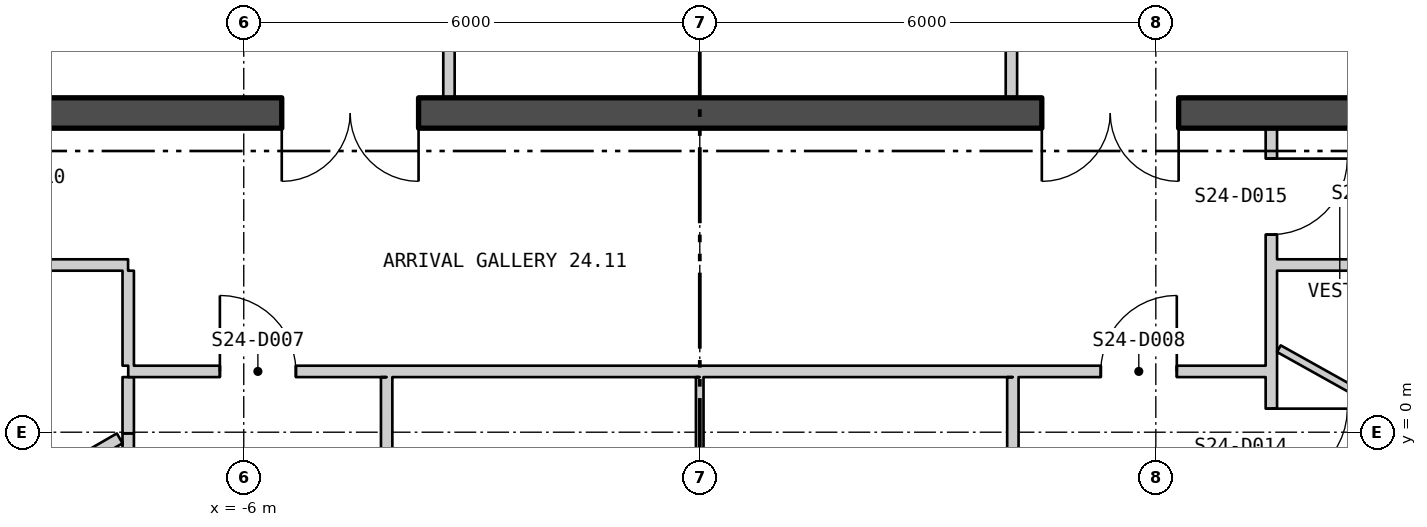
"""IFC4 building model, lengths in metres.
Left out: names, types, materials, properties, quantities, classifications, styles, units other than length and angle.
Written with IfcOpenShell. Run it as: python <this file> out.ifc"""

import sys

from ifc_helpers import new_model, si_unit, direction, frame, frame_2d, origin, place, context, subcontext, project, spatial, polyline, rectangle, outline, extrude, element, fill, save


model = new_model("IFC4")
c1 = context("Model", 3, precision=1e-05, world=origin(), true_north=direction((0.0, 1.0)))
c2 = subcontext(c1, "Body", "Model", "MODEL_VIEW")
j1 = project(units=[si_unit("LENGTHUNIT", "METRE"), si_unit("PLANEANGLEUNIT", "RADIAN")], contexts=[c1])
p1 = place(None, origin())
s1 = spatial("IfcSite", under=j1, at=p1, CompositionType="ELEMENT")
p2 = place(p1, origin())
s2 = spatial("IfcBuilding", under=s1, at=p2, CompositionType="ELEMENT")
p3 = place(p2, frame((0.0, 0.0, 312.6)))
s3 = spatial("IfcBuildingStorey", under=s2, at=p3, CompositionType="ELEMENT", Elevation=312.6)
p4 = place(p3, frame((-24.985, 16.303, -0.18), z_axis=(0.0, 0.0, 1.0), x_axis=(0.500000141277, -0.866025322218, 0.0)))
e1 = element("IfcWall", 1, at=p4, inside=s3, PredefinedType="SOLIDWALL", context=c2, shape_type="SweptSolid", body=[
    extrude(outline(polyline([(-0.13, -0.225), (45.86, -0.225), (45.6, 0.225), (0.13, 0.225), (-0.13, -0.225)])), origin(), (0.0, 0.0, 1.0), 3.98),
])
p5 = place(p4, frame((1.424, 0.0, 1.08)))
e2 = element("IfcOpeningElement", 2, at=p5, cuts=e1, PredefinedType="OPENING", context=c2, shape_type="SweptSolid", body=[
    extrude(rectangle(XDim=2.4, YDim=2.3, at=frame_2d((1.2, 1.15))), frame((0.0, 0.235, 0.0), z_axis=(0.0, -1.0, 0.0), x_axis=(1.0, 0.0, 0.0)), (0.0, 0.0, 1.0), 0.47),
])
p6 = place(p4, frame((5.892, 0.0, 1.08)))
e3 = element("IfcOpeningElement", 3, at=p6, cuts=e1, PredefinedType="OPENING", context=c2, shape_type="SweptSolid", body=[
    extrude(rectangle(XDim=2.4, YDim=2.3, at=frame_2d((1.2, 1.15))), frame((0.0, 0.235, 0.0), z_axis=(0.0, -1.0, 0.0), x_axis=(1.0, 0.0, 0.0)), (0.0, 0.0, 1.0), 0.47),
])
p7 = place(p4, frame((10.399, 0.0, 1.08)))
e4 = element("IfcOpeningElement", 4, at=p7, cuts=e1, PredefinedType="OPENING", context=c2, shape_type="SweptSolid", body=[
    extrude(rectangle(XDim=2.4, YDim=2.3, at=frame_2d((1.2, 1.15))), frame((0.0, 0.235, 0.0), z_axis=(0.0, -1.0, 0.0), x_axis=(1.0, 0.0, 0.0)), (0.0, 0.0, 1.0), 0.47),
])
p8 = place(p4, frame((14.905, 0.0, 1.08)))
e5 = element("IfcOpeningElement", 5, at=p8, cuts=e1, PredefinedType="OPENING", context=c2, shape_type="SweptSolid", body=[
    extrude(rectangle(XDim=2.4, YDim=2.3, at=frame_2d((1.2, 1.15))), frame((0.0, 0.235, 0.0), z_axis=(0.0, -1.0, 0.0), x_axis=(1.0, 0.0, 0.0)), (0.0, 0.0, 1.0), 0.47),
])
p9 = place(p4, frame((19.412, 0.0, 1.08)))
e6 = element("IfcOpeningElement", 6, at=p9, cuts=e1, PredefinedType="OPENING", context=c2, shape_type="SweptSolid", body=[
    extrude(rectangle(XDim=2.4, YDim=2.3, at=frame_2d((1.2, 1.15))), frame((0.0, 0.235, 0.0), z_axis=(0.0, -1.0, 0.0), x_axis=(1.0, 0.0, 0.0)), (0.0, 0.0, 1.0), 0.47),
])
p10 = place(p4, frame((23.918, 0.0, 1.08)))
e7 = element("IfcOpeningElement", 7, at=p10, cuts=e1, PredefinedType="OPENING", context=c2, shape_type="SweptSolid", body=[
    extrude(rectangle(XDim=2.4, YDim=2.3, at=frame_2d((1.2, 1.15))), frame((0.0, 0.235, 0.0), z_axis=(0.0, -1.0, 0.0), x_axis=(1.0, 0.0, 0.0)), (0.0, 0.0, 1.0), 0.47),
])
p11 = place(p4, frame((28.425, 0.0, 1.08)))
e8 = element("IfcOpeningElement", 8, at=p11, cuts=e1, PredefinedType="OPENING", context=c2, shape_type="SweptSolid", body=[
    extrude(rectangle(XDim=2.4, YDim=2.3, at=frame_2d((1.2, 1.15))), frame((0.0, 0.235, 0.0), z_axis=(0.0, -1.0, 0.0), x_axis=(1.0, 0.0, 0.0)), (0.0, 0.0, 1.0), 0.47),
])
p12 = place(p4, frame((37.438, 0.0, 1.08)))
e9 = element("IfcOpeningElement", 9, at=p12, cuts=e1, PredefinedType="OPENING", context=c2, shape_type="SweptSolid", body=[
    extrude(rectangle(XDim=2.4, YDim=2.3, at=frame_2d((1.2, 1.15))), frame((0.0, 0.235, 0.0), z_axis=(0.0, -1.0, 0.0), x_axis=(1.0, 0.0, 0.0)), (0.0, 0.0, 1.0), 0.47),
])
p13 = place(p4, frame((41.907, 0.0, 1.08)))
e10 = element("IfcOpeningElement", 10, at=p13, cuts=e1, PredefinedType="OPENING", context=c2, shape_type="SweptSolid", body=[
    extrude(rectangle(XDim=2.4, YDim=2.3, at=frame_2d((1.2, 1.15))), frame((0.0, 0.235, 0.0), z_axis=(0.0, -1.0, 0.0), x_axis=(1.0, 0.0, 0.0)), (0.0, 0.0, 1.0), 0.47),
])
p14 = place(p3, frame((2.12, -23.301, -0.18), z_axis=(0.0, 0.0, 1.0), x_axis=(0.500000141277, 0.866025322218, 0.0)))
e11 = element("IfcWall", 11, at=p14, inside=s3, PredefinedType="SOLIDWALL", context=c2, shape_type="SweptSolid", body=[
    extrude(outline(polyline([(-0.13, -0.225), (45.86, -0.225), (45.6, 0.225), (0.13, 0.225), (-0.13, -0.225)])), origin(), (0.0, 0.0, 1.0), 3.98),
])
p15 = place(p14, frame((1.424, 0.0, 1.08)))
e12 = element("IfcOpeningElement", 12, at=p15, cuts=e11, PredefinedType="OPENING", context=c2, shape_type="SweptSolid", body=[
    extrude(rectangle(XDim=2.4, YDim=2.3, at=frame_2d((1.2, 1.15))), frame((0.0, 0.235, 0.0), z_axis=(0.0, -1.0, 0.0), x_axis=(1.0, 0.0, 0.0)), (0.0, 0.0, 1.0), 0.47),
])
p16 = place(p14, frame((5.892, 0.0, 1.08)))
e13 = element("IfcOpeningElement", 13, at=p16, cuts=e11, PredefinedType="OPENING", context=c2, shape_type="SweptSolid", body=[
    extrude(rectangle(XDim=2.4, YDim=2.3, at=frame_2d((1.2, 1.15))), frame((0.0, 0.235, 0.0), z_axis=(0.0, -1.0, 0.0), x_axis=(1.0, 0.0, 0.0)), (0.0, 0.0, 1.0), 0.47),
])
p17 = place(p14, frame((14.905, 0.0, 1.08)))
e14 = element("IfcOpeningElement", 14, at=p17, cuts=e11, PredefinedType="OPENING", context=c2, shape_type="SweptSolid", body=[
    extrude(rectangle(XDim=2.4, YDim=2.3, at=frame_2d((1.2, 1.15))), frame((0.0, 0.235, 0.0), z_axis=(0.0, -1.0, 0.0), x_axis=(1.0, 0.0, 0.0)), (0.0, 0.0, 1.0), 0.47),
])
p18 = place(p14, frame((19.412, 0.0, 1.08)))
e15 = element("IfcOpeningElement", 15, at=p18, cuts=e11, PredefinedType="OPENING", context=c2, shape_type="SweptSolid", body=[
    extrude(rectangle(XDim=2.4, YDim=2.3, at=frame_2d((1.2, 1.15))), frame((0.0, 0.235, 0.0), z_axis=(0.0, -1.0, 0.0), x_axis=(1.0, 0.0, 0.0)), (0.0, 0.0, 1.0), 0.47),
])
p19 = place(p14, frame((23.918, 0.0, 1.08)))
e16 = element("IfcOpeningElement", 16, at=p19, cuts=e11, PredefinedType="OPENING", context=c2, shape_type="SweptSolid", body=[
    extrude(rectangle(XDim=2.4, YDim=2.3, at=frame_2d((1.2, 1.15))), frame((0.0, 0.235, 0.0), z_axis=(0.0, -1.0, 0.0), x_axis=(1.0, 0.0, 0.0)), (0.0, 0.0, 1.0), 0.47),
])
p20 = place(p14, frame((28.425, 0.0, 1.08)))
e17 = element("IfcOpeningElement", 17, at=p20, cuts=e11, PredefinedType="OPENING", context=c2, shape_type="SweptSolid", body=[
    extrude(rectangle(XDim=2.4, YDim=2.3, at=frame_2d((1.2, 1.15))), frame((0.0, 0.235, 0.0), z_axis=(0.0, -1.0, 0.0), x_axis=(1.0, 0.0, 0.0)), (0.0, 0.0, 1.0), 0.47),
])
p21 = place(p14, frame((37.438, 0.0, 1.08)))
e18 = element("IfcOpeningElement", 18, at=p21, cuts=e11, PredefinedType="OPENING", context=c2, shape_type="SweptSolid", body=[
    extrude(rectangle(XDim=2.4, YDim=2.3, at=frame_2d((1.2, 1.15))), frame((0.0, 0.235, 0.0), z_axis=(0.0, -1.0, 0.0), x_axis=(1.0, 0.0, 0.0)), (0.0, 0.0, 1.0), 0.47),
])
p22 = place(p14, frame((41.907, 0.0, 1.08)))
e19 = element("IfcOpeningElement", 19, at=p22, cuts=e11, PredefinedType="OPENING", context=c2, shape_type="SweptSolid", body=[
    extrude(rectangle(XDim=2.4, YDim=2.3, at=frame_2d((1.2, 1.15))), frame((0.0, 0.235, 0.0), z_axis=(0.0, -1.0, 0.0), x_axis=(1.0, 0.0, 0.0)), (0.0, 0.0, 1.0), 0.47),
])
p23 = place(p3, frame((-14.5, 4.2, 0.0), z_axis=(0.0, 0.0, 1.0), x_axis=(1.0, 0.0, 0.0)))
e20 = element("IfcWall", 20, at=p23, inside=s3, PredefinedType="SHEAR", context=c2, shape_type="SweptSolid", body=[
    extrude(rectangle(XDim=29.0, YDim=0.4, at=frame_2d((14.5, 0.0))), origin(), (0.0, 0.0, 1.0), 4.0),
])
p24 = place(p23, frame((9.0, 0.0, 0.0)))
e21 = element("IfcOpeningElement", 21, at=p24, cuts=e20, PredefinedType="OPENING", context=c2, shape_type="SweptSolid", body=[
    extrude(rectangle(XDim=1.8, YDim=2.4, at=frame_2d((0.9, 1.2))), frame((0.0, 0.21, 0.0), z_axis=(0.0, -1.0, 0.0), x_axis=(1.0, 0.0, 0.0)), (0.0, 0.0, 1.0), 0.42),
])
p25 = place(p23, frame((19.0, 0.0, 0.0)))
e22 = element("IfcOpeningElement", 22, at=p25, cuts=e20, PredefinedType="OPENING", context=c2, shape_type="SweptSolid", body=[
    extrude(rectangle(XDim=1.8, YDim=2.4, at=frame_2d((0.9, 1.2))), frame((0.0, 0.21, 0.0), z_axis=(0.0, -1.0, 0.0), x_axis=(1.0, 0.0, 0.0)), (0.0, 0.0, 1.0), 0.42),
])
for number, where, z_axis, x_axis in (
    (23, (-3.3, 4.4, 0.0), (0.0, 0.0, 1.0), (0.0, 1.0, 0.0)),
    (24, (4.1, 4.4, 0.0), (0.0, 0.0, 1.0), (0.0, 1.0, 0.0)),
):
    element("IfcWall", number, at=place(p3, frame(where, z_axis=z_axis, x_axis=x_axis)), inside=s3, PredefinedType="PARTITIONING", context=c2, shape_type="SweptSolid", body=[
        extrude(rectangle(XDim=1.895, YDim=0.15, at=frame_2d((0.948, 0.0))), origin(), (0.0, 0.0, 1.0), 4.0),
    ])
p26 = place(p3, frame((-16.225, 2.2, 0.0), z_axis=(0.0, 0.0, 1.0), x_axis=(1.0, 0.0, 0.0)))
e25 = element("IfcWall", 25, at=p26, inside=s3, PredefinedType="PARTITIONING", context=c2, shape_type="SweptSolid", body=[
    extrude(rectangle(XDim=8.703, YDim=0.15, at=frame_2d((4.351, 0.0))), origin(), (0.0, 0.0, 1.0), 4.0),
])
p27 = place(p26, frame((4.232, 0.0, 0.0)))
e26 = element("IfcOpeningElement", 26, at=p27, cuts=e25, PredefinedType="OPENING", context=c2, shape_type="SweptSolid", body=[
    extrude(rectangle(XDim=1.8, YDim=2.1, at=frame_2d((0.9, 1.05))), frame((0.0, 0.085, 0.0), z_axis=(0.0, -1.0, 0.0), x_axis=(1.0, 0.0, 0.0)), (0.0, 0.0, 1.0), 0.17),
])
p28 = place(p3, frame((-12.968, -3.161, 0.0), z_axis=(0.0, 0.0, 1.0), x_axis=(0.8660774803, 0.499909789979, 0.0)))
e27 = element("IfcWall", 27, at=p28, inside=s3, PredefinedType="PARTITIONING", context=c2, shape_type="SweptSolid", body=[
    extrude(rectangle(XDim=6.161, YDim=0.15, at=frame_2d((3.081, 0.0))), origin(), (0.0, 0.0, 1.0), 4.0),
])
p29 = place(p3, frame((-7.52, -13.498, 0.0), z_axis=(0.0, 0.0, 1.0), x_axis=(0.0, 1.0, 0.0)))
e28 = element("IfcWall", 28, at=p29, inside=s3, PredefinedType="PARTITIONING", context=c2, shape_type="SweptSolid", body=[
    extrude(rectangle(XDim=13.482, YDim=0.15, at=frame_2d((6.741, 0.0))), origin(), (0.0, 0.0, 1.0), 4.0),
])
p30 = place(p29, frame((3.639, 0.0, 0.0)))
e29 = element("IfcOpeningElement", 29, at=p30, cuts=e28, PredefinedType="OPENING", context=c2, shape_type="SweptSolid", body=[
    extrude(rectangle(XDim=1.0, YDim=2.1, at=frame_2d((0.5, 1.05))), frame((0.0, 0.085, 0.0), z_axis=(0.0, -1.0, 0.0), x_axis=(1.0, 0.0, 0.0)), (0.0, 0.0, 1.0), 0.17),
])
p31 = place(p29, frame((11.681, 0.0, 0.0)))
e30 = element("IfcOpeningElement", 30, at=p31, cuts=e28, PredefinedType="OPENING", context=c2, shape_type="SweptSolid", body=[
    extrude(rectangle(XDim=1.0, YDim=2.1, at=frame_2d((0.5, 1.05))), frame((0.0, 0.085, 0.0), z_axis=(0.0, -1.0, 0.0), x_axis=(1.0, 0.0, 0.0)), (0.0, 0.0, 1.0), 0.17),
])
p32 = place(p3, frame((-7.52, -0.014, 0.0), z_axis=(0.0, 0.0, 1.0), x_axis=(0.0, 1.0, 0.0)))
e31 = element("IfcWall", 31, at=p32, inside=s3, PredefinedType="PARTITIONING", context=c2, shape_type="SweptSolid", body=[
    extrude(rectangle(XDim=0.739, YDim=0.15, at=frame_2d((0.369, 0.0))), origin(), (0.0, 0.0, 1.0), 4.0),
])
p33 = place(p3, frame((-7.52, 0.8, 0.0), z_axis=(0.0, 0.0, 1.0), x_axis=(1.0, 0.0, 0.0)))
e32 = element("IfcWall", 32, at=p33, inside=s3, PredefinedType="PARTITIONING", context=c2, shape_type="SweptSolid", body=[
    extrude(rectangle(XDim=14.965, YDim=0.15, at=frame_2d((7.482, 0.0))), origin(), (0.0, 0.0, 1.0), 4.0),
])
p34 = place(p33, frame((1.206, 0.0, 0.0)))
e33 = element("IfcOpeningElement", 33, at=p34, cuts=e32, PredefinedType="OPENING", context=c2, shape_type="SweptSolid", body=[
    extrude(rectangle(XDim=1.0, YDim=2.1, at=frame_2d((0.5, 1.05))), frame((0.0, 0.085, 0.0), z_axis=(0.0, -1.0, 0.0), x_axis=(1.0, 0.0, 0.0)), (0.0, 0.0, 1.0), 0.17),
])
p35 = place(p33, frame((12.796, 0.0, 0.0)))
e34 = element("IfcOpeningElement", 34, at=p35, cuts=e32, PredefinedType="OPENING", context=c2, shape_type="SweptSolid", body=[
    extrude(rectangle(XDim=1.0, YDim=2.1, at=frame_2d((0.5, 1.05))), frame((0.0, 0.085, 0.0), z_axis=(0.0, -1.0, 0.0), x_axis=(1.0, 0.0, 0.0)), (0.0, 0.0, 1.0), 0.17),
])
p36 = place(p3, frame((-7.52, 0.875, 0.0), z_axis=(0.0, 0.0, 1.0), x_axis=(0.0, 1.0, 0.0)))
e35 = element("IfcWall", 35, at=p36, inside=s3, PredefinedType="PARTITIONING", context=c2, shape_type="SweptSolid", body=[
    extrude(rectangle(XDim=1.25, YDim=0.15, at=frame_2d((0.625, 0.0))), origin(), (0.0, 0.0, 1.0), 4.0),
])
p37 = place(p3, frame((-4.12, 0.725, 0.0), z_axis=(0.0, 0.0, 1.0), x_axis=(0.000237812122, -0.999999971723, 0.0)))
e36 = element("IfcWall", 36, at=p37, inside=s3, PredefinedType="PARTITIONING", context=c2, shape_type="SweptSolid", body=[
    extrude(rectangle(XDim=4.205, YDim=0.15, at=frame_2d((2.103, 0.0))), origin(), (0.0, 0.0, 1.0), 4.0),
])
p38 = place(p37, frame((3.005, 0.0, 0.0)))
e37 = element("IfcOpeningElement", 37, at=p38, cuts=e36, PredefinedType="OPENING", context=c2, shape_type="SweptSolid", body=[
    extrude(rectangle(XDim=1.0, YDim=2.1, at=frame_2d((0.5, 1.05))), frame((0.0, 0.085, 0.0), z_axis=(0.0, -1.0, 0.0), x_axis=(1.0, 0.0, 0.0)), (0.0, 0.0, 1.0), 0.17),
])
p39 = place(p3, frame((-0.001, 0.725, 0.0), z_axis=(0.0, 0.0, 1.0), x_axis=(0.000235294111, -0.999999972318, 0.0)))
e38 = element("IfcWall", 38, at=p39, inside=s3, PredefinedType="PARTITIONING", context=c2, shape_type="SweptSolid", body=[
    extrude(rectangle(XDim=3.825, YDim=0.1, at=frame_2d((1.913, 0.0))), origin(), (0.0, 0.0, 1.0), 3.55),
])
p40 = place(p3, frame((4.119, 0.725, 0.0), z_axis=(0.0, 0.0, 1.0), x_axis=(0.000237812122, -0.999999971723, 0.0)))
e39 = element("IfcWall", 39, at=p40, inside=s3, PredefinedType="PARTITIONING", context=c2, shape_type="SweptSolid", body=[
    extrude(rectangle(XDim=4.205, YDim=0.15, at=frame_2d((2.103, 0.0))), origin(), (0.0, 0.0, 1.0), 4.0),
])
p41 = place(p40, frame((3.005, 0.0, 0.0)))
e40 = element("IfcOpeningElement", 40, at=p41, cuts=e39, PredefinedType="OPENING", context=c2, shape_type="SweptSolid", body=[
    extrude(rectangle(XDim=1.0, YDim=2.1, at=frame_2d((0.5, 1.05))), frame((0.0, 0.085, 0.0), z_axis=(0.0, -1.0, 0.0), x_axis=(1.0, 0.0, 0.0)), (0.0, 0.0, 1.0), 0.17),
])
p42 = place(p3, frame((7.52, -13.498, 0.0), z_axis=(0.0, 0.0, 1.0), x_axis=(0.0, 1.0, 0.0)))
e41 = element("IfcWall", 41, at=p42, inside=s3, PredefinedType="PARTITIONING", context=c2, shape_type="SweptSolid", body=[
    extrude(rectangle(XDim=17.498, YDim=0.15, at=frame_2d((8.749, 0.0))), origin(), (0.0, 0.0, 1.0), 4.0),
])
p43 = place(p42, frame((3.639, 0.0, 0.0)))
e42 = element("IfcOpeningElement", 42, at=p43, cuts=e41, PredefinedType="OPENING", context=c2, shape_type="SweptSolid", body=[
    extrude(rectangle(XDim=1.0, YDim=2.1, at=frame_2d((0.5, 1.05))), frame((0.0, 0.085, 0.0), z_axis=(0.0, -1.0, 0.0), x_axis=(1.0, 0.0, 0.0)), (0.0, 0.0, 1.0), 0.17),
])
p44 = place(p42, frame((12.808, 0.0, 0.0)))
e43 = element("IfcOpeningElement", 43, at=p44, cuts=e41, PredefinedType="OPENING", context=c2, shape_type="SweptSolid", body=[
    extrude(rectangle(XDim=1.0, YDim=2.1, at=frame_2d((0.5, 1.05))), frame((0.0, 0.085, 0.0), z_axis=(0.0, -1.0, 0.0), x_axis=(1.0, 0.0, 0.0)), (0.0, 0.0, 1.0), 0.17),
])
p45 = place(p42, frame((16.098, 0.0, 0.0)))
e44 = element("IfcOpeningElement", 44, at=p45, cuts=e41, PredefinedType="OPENING", context=c2, shape_type="SweptSolid", body=[
    extrude(rectangle(XDim=1.0, YDim=2.1, at=frame_2d((0.5, 1.05))), frame((0.0, 0.085, 0.0), z_axis=(0.0, -1.0, 0.0), x_axis=(1.0, 0.0, 0.0)), (0.0, 0.0, 1.0), 0.17),
])
p46 = place(p3, frame((7.595, 2.2, 0.0), z_axis=(0.0, 0.0, 1.0), x_axis=(1.0, 0.0, 0.0)))
e45 = element("IfcWall", 45, at=p46, inside=s3, PredefinedType="PARTITIONING", context=c2, shape_type="SweptSolid", body=[
    extrude(rectangle(XDim=8.63, YDim=0.15, at=frame_2d((4.315, 0.0))), origin(), (0.0, 0.0, 1.0), 4.0),
])
p47 = place(p46, frame((3.815, 0.0, 0.0)))
e46 = element("IfcOpeningElement", 46, at=p47, cuts=e45, PredefinedType="OPENING", context=c2, shape_type="SweptSolid", body=[
    extrude(rectangle(XDim=1.0, YDim=2.1, at=frame_2d((0.5, 1.05))), frame((0.0, 0.085, 0.0), z_axis=(0.0, -1.0, 0.0), x_axis=(1.0, 0.0, 0.0)), (0.0, 0.0, 1.0), 0.17),
])
p48 = place(p3, frame((7.619, 1.099, 0.0), z_axis=(0.0, 0.0, 1.0), x_axis=(0.873148302033, -0.487454657026, 0.0)))
e47 = element("IfcWall", 47, at=p48, inside=s3, PredefinedType="PARTITIONING", context=c2, shape_type="SweptSolid", body=[
    extrude(rectangle(XDim=7.213, YDim=0.1, at=frame_2d((3.607, 0.0))), origin(), (0.0, 0.0, 1.0), 4.0),
])
p49 = place(p24, origin())
e48 = element("IfcDoor", 48, at=p49, inside=s3, OperationType="DOUBLE_DOOR_SINGLE_SWING", PredefinedType="DOOR", context=c2, shape_type="SweptSolid", body=[
    extrude(rectangle(XDim=1.8, YDim=2.4, at=frame_2d((0.9, 1.2))), frame((0.0, 0.025, 0.0), z_axis=(0.0, -1.0, 0.0), x_axis=(1.0, 0.0, 0.0)), (0.0, 0.0, 1.0), 0.05),
])
fill(e21, e48)
p50 = place(p25, origin())
e49 = element("IfcDoor", 49, at=p50, inside=s3, OperationType="DOUBLE_DOOR_SINGLE_SWING", PredefinedType="DOOR", context=c2, shape_type="SweptSolid", body=[
    extrude(rectangle(XDim=1.8, YDim=2.4, at=frame_2d((0.9, 1.2))), frame((0.0, 0.025, 0.0), z_axis=(0.0, -1.0, 0.0), x_axis=(1.0, 0.0, 0.0)), (0.0, 0.0, 1.0), 0.05),
])
fill(e22, e49)
p51 = place(p34, origin())
e50 = element("IfcDoor", 50, at=p51, inside=s3, OperationType="SINGLE_SWING_RIGHT", PredefinedType="DOOR", context=c2, shape_type="SweptSolid", body=[
    extrude(rectangle(XDim=1.0, YDim=2.1, at=frame_2d((0.5, 1.05))), frame((0.0, 0.025, 0.0), z_axis=(0.0, -1.0, 0.0), x_axis=(1.0, 0.0, 0.0)), (0.0, 0.0, 1.0), 0.05),
])
fill(e33, e50)
p52 = place(p35, origin())
e51 = element("IfcDoor", 51, at=p52, inside=s3, OperationType="SINGLE_SWING_LEFT", PredefinedType="DOOR", context=c2, shape_type="SweptSolid", body=[
    extrude(rectangle(XDim=1.0, YDim=2.1, at=frame_2d((0.5, 1.05))), frame((0.0, 0.025, 0.0), z_axis=(0.0, -1.0, 0.0), x_axis=(1.0, 0.0, 0.0)), (0.0, 0.0, 1.0), 0.05),
])
fill(e34, e51)
p53 = place(p44, origin())
e52 = element("IfcDoor", 52, at=p53, inside=s3, OperationType="SINGLE_SWING_RIGHT", PredefinedType="DOOR", context=c2, shape_type="SweptSolid", body=[
    extrude(rectangle(XDim=1.0, YDim=2.1, at=frame_2d((0.5, 1.05))), frame((0.0, 0.025, 0.0), z_axis=(0.0, -1.0, 0.0), x_axis=(1.0, 0.0, 0.0)), (0.0, 0.0, 1.0), 0.05),
])
fill(e43, e52)
p54 = place(p45, origin())
e53 = element("IfcDoor", 53, at=p54, inside=s3, OperationType="SINGLE_SWING_RIGHT", PredefinedType="DOOR", context=c2, shape_type="SweptSolid", body=[
    extrude(rectangle(XDim=1.0, YDim=2.1, at=frame_2d((0.5, 1.05))), frame((0.0, 0.025, 0.0), z_axis=(0.0, -1.0, 0.0), x_axis=(1.0, 0.0, 0.0)), (0.0, 0.0, 1.0), 0.05),
])
fill(e44, e53)
save(model, sys.argv[1])
